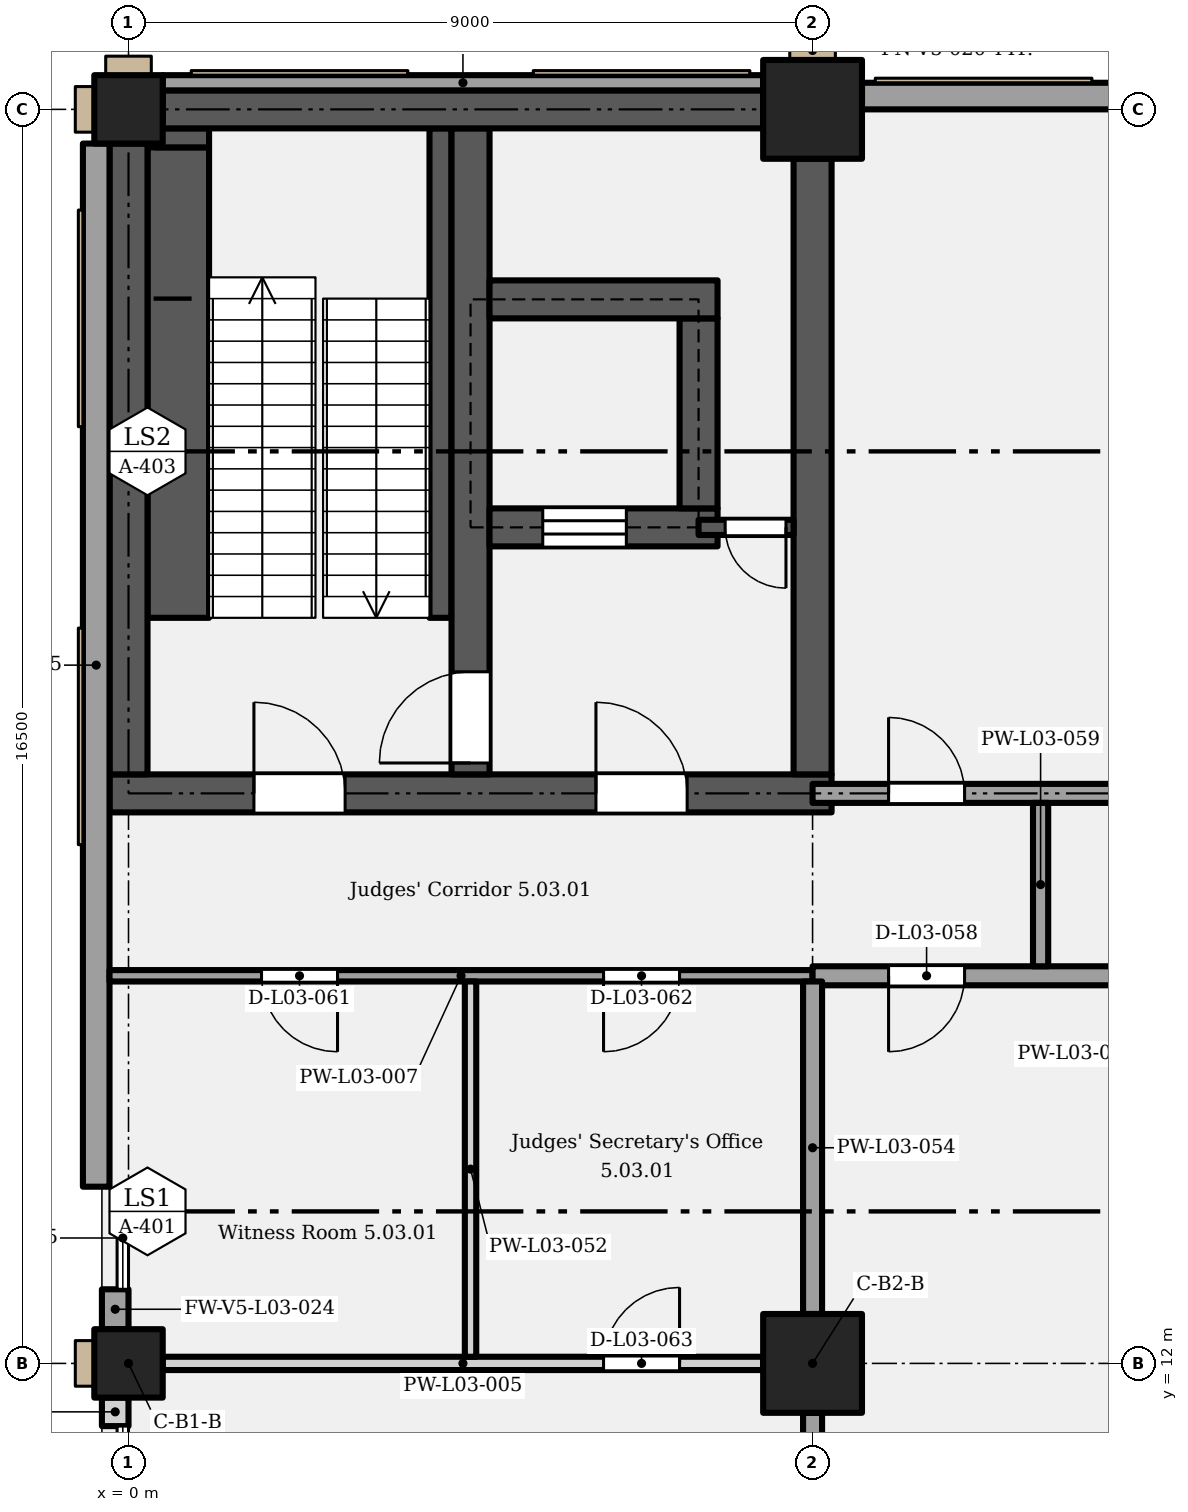
"""IFC4 building model, lengths in metres.
Left out: names, types, materials, properties, quantities, classifications, styles, units other than length and angle.
Written with IfcOpenShell. Run it as: python <this file> out.ifc"""

import sys

from ifc_helpers import new_model, si_unit, direction, frame, frame_2d, origin, origin_2d, place, context, subcontext, project, spatial, rectangle, extrude, element, fill, save


model = new_model("IFC4")
c1 = context("Model", 3, precision=1e-05, world=origin(), true_north=direction((0.0, 1.0)))
c2 = subcontext(c1, "Body", "Model", "MODEL_VIEW")
j1 = project(units=[si_unit("LENGTHUNIT", "METRE"), si_unit("PLANEANGLEUNIT", "RADIAN")], contexts=[c1])
p1 = place(None, origin())
s1 = spatial("IfcSite", under=j1, at=p1, CompositionType="ELEMENT")
p2 = place(p1, origin())
s2 = spatial("IfcBuilding", under=s1, at=p2, CompositionType="ELEMENT")
p3 = place(p2, frame((0.0, 0.0, 17.4)))
s3 = spatial("IfcBuildingStorey", under=s2, at=p3, CompositionType="ELEMENT", Elevation=17.4)
p4 = place(p3, frame((0.0, 12.0, 0.0), z_axis=(0.0, 0.0, 1.0), x_axis=(1.0, 0.0, 0.0)))
e1 = element("IfcColumn", 1, at=p4, inside=s3, PredefinedType="COLUMN", context=c2, shape_type="SweptSolid", body=[
    extrude(rectangle(XDim=0.9, YDim=0.9, at=origin_2d()), origin(), (0.0, 0.0, 1.0), 5.4),
])
p5 = place(p3, frame((9.0, 12.0, 0.0), z_axis=(0.0, 0.0, 1.0), x_axis=(1.0, 0.0, 0.0)))
e2 = element("IfcColumn", 2, at=p5, inside=s3, PredefinedType="COLUMN", context=c2, shape_type="SweptSolid", body=[
    extrude(rectangle(XDim=1.3, YDim=1.3, at=origin_2d()), origin(), (0.0, 0.0, 1.0), 5.4),
])
p6 = place(p3, frame((0.0, 28.5, 0.0), z_axis=(0.0, 0.0, 1.0), x_axis=(1.0, 0.0, 0.0)))
e3 = element("IfcColumn", 3, at=p6, inside=s3, PredefinedType="COLUMN", context=c2, shape_type="SweptSolid", body=[
    extrude(rectangle(XDim=0.9, YDim=0.9, at=origin_2d()), origin(), (0.0, 0.0, 1.0), 5.4),
])
p7 = place(p3, frame((9.0, 28.5, 0.0), z_axis=(0.0, 0.0, 1.0), x_axis=(1.0, 0.0, 0.0)))
e4 = element("IfcColumn", 4, at=p7, inside=s3, PredefinedType="COLUMN", context=c2, shape_type="SweptSolid", body=[
    extrude(rectangle(XDim=1.3, YDim=1.3, at=origin_2d()), origin(), (0.0, 0.0, 1.0), 5.4),
])
p8 = place(p3, frame((-0.25, 19.5, 0.0), z_axis=(0.0, 0.0, 1.0), x_axis=(1.0, 0.0, 0.0)))
e5 = element("IfcWall", 5, at=p8, inside=s3, PredefinedType="SHEAR", context=c2, shape_type="SweptSolid", body=[
    extrude(rectangle(XDim=9.5, YDim=0.5, at=frame_2d((4.75, 0.0))), origin(), (0.0, 0.0, 1.0), 5.15),
])
p9 = place(p8, frame((1.9, 0.0, 0.0)))
e6 = element("IfcOpeningElement", 6, at=p9, cuts=e5, PredefinedType="OPENING", context=c2, shape_type="SweptSolid", body=[
    extrude(rectangle(XDim=1.2, YDim=2.1, at=frame_2d((0.6, 1.05))), frame((0.0, 0.26, 0.0), z_axis=(0.0, -1.0, 0.0), x_axis=(1.0, 0.0, 0.0)), (0.0, 0.0, 1.0), 0.52),
])
p10 = place(p8, frame((6.4, 0.0, 0.0)))
e7 = element("IfcOpeningElement", 7, at=p10, cuts=e5, PredefinedType="OPENING", context=c2, shape_type="SweptSolid", body=[
    extrude(rectangle(XDim=1.2, YDim=2.1, at=frame_2d((0.6, 1.05))), frame((0.0, 0.26, 0.0), z_axis=(0.0, -1.0, 0.0), x_axis=(1.0, 0.0, 0.0)), (0.0, 0.0, 1.0), 0.52),
])
p11 = place(p3, frame((0.0, 19.75, 0.0), z_axis=(0.0, 0.0, 1.0), x_axis=(0.0, 1.0, 0.0)))
e8 = element("IfcWall", 8, at=p11, inside=s3, PredefinedType="SHEAR", context=c2, shape_type="SweptSolid", body=[
    extrude(rectangle(XDim=8.3, YDim=0.5, at=frame_2d((4.15, 0.0))), origin(), (0.0, 0.0, 1.0), 5.15),
])
p12 = place(p3, frame((4.5, 19.75, 0.0), z_axis=(0.0, 0.0, 1.0), x_axis=(0.0, 1.0, 0.0)))
e9 = element("IfcWall", 9, at=p12, inside=s3, PredefinedType="SHEAR", context=c2, shape_type="SweptSolid", body=[
    extrude(rectangle(XDim=8.5, YDim=0.5, at=frame_2d((4.25, 0.0))), origin(), (0.0, 0.0, 1.0), 5.15),
])
p13 = place(p12, frame((0.15, 0.0, 0.0)))
e10 = element("IfcOpeningElement", 10, at=p13, cuts=e9, PredefinedType="OPENING", context=c2, shape_type="SweptSolid", body=[
    extrude(rectangle(XDim=1.2, YDim=2.1, at=frame_2d((0.6, 1.05))), frame((0.0, 0.26, 0.0), z_axis=(0.0, -1.0, 0.0), x_axis=(1.0, 0.0, 0.0)), (0.0, 0.0, 1.0), 0.52),
])
p14 = place(p3, frame((9.0, 19.75, 0.0), z_axis=(0.0, 0.0, 1.0), x_axis=(0.0, 1.0, 0.0)))
e11 = element("IfcWall", 11, at=p14, inside=s3, PredefinedType="SHEAR", context=c2, shape_type="SweptSolid", body=[
    extrude(rectangle(XDim=8.1, YDim=0.5, at=frame_2d((4.05, 0.0))), origin(), (0.0, 0.0, 1.0), 5.15),
])
p15 = place(p3, frame((4.75, 23.0, 0.0), z_axis=(0.0, 0.0, 1.0), x_axis=(1.0, 0.0, 0.0)))
e12 = element("IfcWall", 12, at=p15, inside=s3, PredefinedType="SHEAR", context=c2, shape_type="SweptSolid", body=[
    extrude(rectangle(XDim=3.0, YDim=0.5, at=frame_2d((1.5, 0.0))), origin(), (0.0, 0.0, 1.0), 5.15),
])
p16 = place(p15, frame((0.7, 0.0, 0.0)))
e13 = element("IfcOpeningElement", 13, at=p16, cuts=e12, PredefinedType="OPENING", context=c2, shape_type="SweptSolid", body=[
    extrude(rectangle(XDim=1.1, YDim=2.1, at=frame_2d((0.55, 1.05))), frame((0.0, 0.26, 0.0), z_axis=(0.0, -1.0, 0.0), x_axis=(1.0, 0.0, 0.0)), (0.0, 0.0, 1.0), 0.52),
])
p17 = place(p3, frame((7.5, 23.25, 0.0), z_axis=(0.0, 0.0, 1.0), x_axis=(0.0, 1.0, 0.0)))
e14 = element("IfcWall", 14, at=p17, inside=s3, PredefinedType="SHEAR", context=c2, shape_type="SweptSolid", body=[
    extrude(rectangle(XDim=2.5, YDim=0.5, at=frame_2d((1.25, 0.0))), origin(), (0.0, 0.0, 1.0), 5.15),
])
p18 = place(p3, frame((4.75, 26.0, 0.0), z_axis=(0.0, 0.0, 1.0), x_axis=(1.0, 0.0, 0.0)))
e15 = element("IfcWall", 15, at=p18, inside=s3, PredefinedType="SHEAR", context=c2, shape_type="SweptSolid", body=[
    extrude(rectangle(XDim=3.0, YDim=0.5, at=frame_2d((1.5, 0.0))), origin(), (0.0, 0.0, 1.0), 5.15),
])
p19 = place(p3, frame((0.45, 28.5, 0.0), z_axis=(0.0, 0.0, 1.0), x_axis=(1.0, 0.0, 0.0)))
e16 = element("IfcWall", 16, at=p19, inside=s3, PredefinedType="SHEAR", context=c2, shape_type="SweptSolid", body=[
    extrude(rectangle(XDim=7.9, YDim=0.5, at=frame_2d((3.95, 0.0))), origin(), (0.0, 0.0, 1.0), 5.15),
])
p20 = place(p3, frame((0.45, 28.85, 0.0), z_axis=(0.0, 0.0, 1.0), x_axis=(1.0, 0.0, 0.0)))
e17 = element("IfcWall", 17, at=p20, inside=s3, PredefinedType="SOLIDWALL", context=c2, shape_type="SweptSolid", body=[
    extrude(rectangle(XDim=7.9, YDim=0.2, at=frame_2d((3.95, 0.0))), origin(), (0.0, 0.0, 1.0), 5.15),
])
p21 = place(p3, frame((9.65, 28.675, 0.0), z_axis=(0.0, 0.0, 1.0), x_axis=(1.0, 0.0, 0.0)))
e18 = element("IfcWall", 18, at=p21, inside=s3, PredefinedType="SOLIDWALL", context=c2, shape_type="SweptSolid", body=[
    extrude(rectangle(XDim=7.7, YDim=0.35, at=frame_2d((3.85, 0.0))), origin(), (0.0, 0.0, 1.0), 5.15),
])
p22 = place(p3, frame((-0.175, 11.175, 0.0), z_axis=(0.0, 0.0, 1.0), x_axis=(0.0, 1.0, 0.0)))
e19 = element("IfcWall", 19, at=p22, inside=s3, PredefinedType="SOLIDWALL", context=c2, shape_type="SweptSolid", body=[
    extrude(rectangle(XDim=0.375, YDim=0.35, at=frame_2d((0.188, 0.0))), origin(), (0.0, 0.0, 1.0), 5.15),
])
p23 = place(p3, frame((-0.175, 12.45, 0.0), z_axis=(0.0, 0.0, 1.0), x_axis=(0.0, 1.0, 0.0)))
e20 = element("IfcWall", 20, at=p23, inside=s3, PredefinedType="SOLIDWALL", context=c2, shape_type="SweptSolid", body=[
    extrude(rectangle(XDim=0.525, YDim=0.35, at=frame_2d((0.263, 0.0))), origin(), (0.0, 0.0, 1.0), 5.15),
])
p24 = place(p3, frame((-0.425, 14.325, 0.0), z_axis=(0.0, 0.0, 1.0), x_axis=(0.0, 1.0, 0.0)))
e21 = element("IfcWall", 21, at=p24, inside=s3, PredefinedType="SOLIDWALL", context=c2, shape_type="SweptSolid", body=[
    extrude(rectangle(XDim=13.725, YDim=0.35, at=frame_2d((6.863, 0.0))), origin(), (0.0, 0.0, 1.0), 5.15),
])
p25 = place(p3, frame((0.45, 12.0, 0.0), z_axis=(0.0, 0.0, 1.0), x_axis=(1.0, 0.0, 0.0)))
e22 = element("IfcWall", 22, at=p25, inside=s3, PredefinedType="PARTITIONING", context=c2, shape_type="SweptSolid", body=[
    extrude(rectangle(XDim=7.9, YDim=0.175, at=frame_2d((3.95, 0.0))), origin(), (0.0, 0.0, 1.0), 4.4),
])
p26 = place(p25, frame((5.8, 0.0, 0.0)))
e23 = element("IfcOpeningElement", 23, at=p26, cuts=e22, PredefinedType="OPENING", context=c2, shape_type="SweptSolid", body=[
    extrude(rectangle(XDim=1.0, YDim=2.1, at=frame_2d((0.5, 1.05))), frame((0.0, 0.097, 0.0), z_axis=(0.0, -1.0, 0.0), x_axis=(1.0, 0.0, 0.0)), (0.0, 0.0, 1.0), 0.195),
])
p27 = place(p3, frame((-0.25, 17.1, 0.0), z_axis=(0.0, 0.0, 1.0), x_axis=(1.0, 0.0, 0.0)))
e24 = element("IfcWall", 24, at=p27, inside=s3, PredefinedType="PARTITIONING", context=c2, shape_type="SweptSolid", body=[
    extrude(rectangle(XDim=9.25, YDim=0.15, at=frame_2d((4.625, 0.0))), origin(), (0.0, 0.0, 1.0), 5.15),
])
p28 = place(p27, frame((3.0, 0.0, 0.0), z_axis=(0.0, 0.0, 1.0), x_axis=(-1.0, 0.0, 0.0)))
e25 = element("IfcOpeningElement", 25, at=p28, cuts=e24, PredefinedType="OPENING", context=c2, shape_type="SweptSolid", body=[
    extrude(rectangle(XDim=1.0, YDim=2.1, at=frame_2d((0.5, 1.05))), frame((0.0, 0.085, 0.0), z_axis=(0.0, -1.0, 0.0), x_axis=(1.0, 0.0, 0.0)), (0.0, 0.0, 1.0), 0.17),
])
p29 = place(p27, frame((7.5, 0.0, 0.0), z_axis=(0.0, 0.0, 1.0), x_axis=(-1.0, 0.0, 0.0)))
e26 = element("IfcOpeningElement", 26, at=p29, cuts=e24, PredefinedType="OPENING", context=c2, shape_type="SweptSolid", body=[
    extrude(rectangle(XDim=1.0, YDim=2.1, at=frame_2d((0.5, 1.05))), frame((0.0, 0.085, 0.0), z_axis=(0.0, -1.0, 0.0), x_axis=(1.0, 0.0, 0.0)), (0.0, 0.0, 1.0), 0.17),
])
p30 = place(p3, frame((9.0, 17.1, 0.0), z_axis=(0.0, 0.0, 1.0), x_axis=(1.0, 0.0, 0.0)))
e27 = element("IfcWall", 27, at=p30, inside=s3, PredefinedType="PARTITIONING", context=c2, shape_type="SweptSolid", body=[
    extrude(rectangle(XDim=9.0, YDim=0.25, at=frame_2d((4.5, 0.0))), origin(), (0.0, 0.0, 1.0), 5.15),
])
p31 = place(p30, frame((6.9, 0.0, 0.0), z_axis=(0.0, 0.0, 1.0), x_axis=(-1.0, 0.0, 0.0)))
e28 = element("IfcOpeningElement", 28, at=p31, cuts=e27, PredefinedType="OPENING", context=c2, shape_type="SweptSolid", body=[
    extrude(rectangle(XDim=1.8, YDim=2.4, at=frame_2d((0.9, 1.2))), frame((0.0, 0.135, 0.0), z_axis=(0.0, -1.0, 0.0), x_axis=(1.0, 0.0, 0.0)), (0.0, 0.0, 1.0), 0.27),
])
p32 = place(p30, frame((2.0, 0.0, 0.0), z_axis=(0.0, 0.0, 1.0), x_axis=(-1.0, 0.0, 0.0)))
e29 = element("IfcOpeningElement", 29, at=p32, cuts=e27, PredefinedType="OPENING", context=c2, shape_type="SweptSolid", body=[
    extrude(rectangle(XDim=1.0, YDim=2.1, at=frame_2d((0.5, 1.05))), frame((0.0, 0.135, 0.0), z_axis=(0.0, -1.0, 0.0), x_axis=(1.0, 0.0, 0.0)), (0.0, 0.0, 1.0), 0.27),
])
p33 = place(p3, frame((9.0, 19.5, 0.0), z_axis=(0.0, 0.0, 1.0), x_axis=(1.0, 0.0, 0.0)))
e30 = element("IfcWall", 30, at=p33, inside=s3, PredefinedType="PARTITIONING", context=c2, shape_type="SweptSolid", body=[
    extrude(rectangle(XDim=9.0, YDim=0.25, at=frame_2d((4.5, 0.0))), origin(), (0.0, 0.0, 1.0), 5.15),
])
p34 = place(p33, frame((5.1, 0.0, 0.0)))
e31 = element("IfcOpeningElement", 31, at=p34, cuts=e30, PredefinedType="OPENING", context=c2, shape_type="SweptSolid", body=[
    extrude(rectangle(XDim=1.8, YDim=2.4, at=frame_2d((0.9, 1.2))), frame((0.0, 0.135, 0.0), z_axis=(0.0, -1.0, 0.0), x_axis=(1.0, 0.0, 0.0)), (0.0, 0.0, 1.0), 0.27),
])
p35 = place(p33, frame((1.0, 0.0, 0.0)))
e32 = element("IfcOpeningElement", 32, at=p35, cuts=e30, PredefinedType="OPENING", context=c2, shape_type="SweptSolid", body=[
    extrude(rectangle(XDim=1.0, YDim=2.1, at=frame_2d((0.5, 1.05))), frame((0.0, 0.135, 0.0), z_axis=(0.0, -1.0, 0.0), x_axis=(1.0, 0.0, 0.0)), (0.0, 0.0, 1.0), 0.27),
])
p36 = place(p3, frame((7.5, 23.0, 0.0), z_axis=(0.0, 0.0, 1.0), x_axis=(1.0, 0.0, 0.0)))
e33 = element("IfcWall", 33, at=p36, inside=s3, PredefinedType="SHEAR", context=c2, shape_type="SweptSolid", body=[
    extrude(rectangle(XDim=1.25, YDim=0.2, at=frame_2d((0.625, 0.0))), origin(), (0.0, 0.0, 1.0), 5.15),
])
p37 = place(p36, frame((1.15, 0.0, 0.0), z_axis=(0.0, 0.0, 1.0), x_axis=(-1.0, 0.0, 0.0)))
e34 = element("IfcOpeningElement", 34, at=p37, cuts=e33, PredefinedType="OPENING", context=c2, shape_type="SweptSolid", body=[
    extrude(rectangle(XDim=0.8, YDim=2.0, at=frame_2d((0.4, 1.0))), frame((0.0, 0.11, 0.0), z_axis=(0.0, -1.0, 0.0), x_axis=(1.0, 0.0, 0.0)), (0.0, 0.0, 1.0), 0.22),
])
p38 = place(p3, frame((4.5, 12.087, 0.0), z_axis=(0.0, 0.0, 1.0), x_axis=(0.0, 1.0, 0.0)))
e35 = element("IfcWall", 35, at=p38, inside=s3, PredefinedType="PARTITIONING", context=c2, shape_type="SweptSolid", body=[
    extrude(rectangle(XDim=4.938, YDim=0.15, at=frame_2d((2.469, 0.0))), origin(), (0.0, 0.0, 1.0), 5.15),
])
p39 = place(p3, frame((9.0, 0.65, 0.0), z_axis=(0.0, 0.0, 1.0), x_axis=(0.0, 1.0, 0.0)))
e36 = element("IfcWall", 36, at=p39, inside=s3, PredefinedType="PARTITIONING", context=c2, shape_type="SweptSolid", body=[
    extrude(rectangle(XDim=10.7, YDim=0.25, at=frame_2d((5.35, 0.0))), origin(), (0.0, 0.0, 1.0), 4.4),
])
p40 = place(p39, frame((5.85, 0.0, 0.0), z_axis=(0.0, 0.0, 1.0), x_axis=(-1.0, 0.0, 0.0)))
e37 = element("IfcOpeningElement", 37, at=p40, cuts=e36, PredefinedType="OPENING", context=c2, shape_type="SweptSolid", body=[
    extrude(rectangle(XDim=1.0, YDim=2.1, at=frame_2d((0.5, 1.05))), frame((0.0, 0.135, 0.0), z_axis=(0.0, -1.0, 0.0), x_axis=(1.0, 0.0, 0.0)), (0.0, 0.0, 1.0), 0.27),
])
p41 = place(p3, frame((9.0, 12.65, 0.0), z_axis=(0.0, 0.0, 1.0), x_axis=(0.0, 1.0, 0.0)))
e38 = element("IfcWall", 38, at=p41, inside=s3, PredefinedType="PARTITIONING", context=c2, shape_type="SweptSolid", body=[
    extrude(rectangle(XDim=4.375, YDim=0.25, at=frame_2d((2.188, 0.0))), origin(), (0.0, 0.0, 1.0), 4.2),
])
p42 = place(p3, frame((12.0, 17.225, 0.0), z_axis=(0.0, 0.0, 1.0), x_axis=(0.0, 1.0, 0.0)))
e39 = element("IfcWall", 39, at=p42, inside=s3, PredefinedType="PARTITIONING", context=c2, shape_type="SweptSolid", body=[
    extrude(rectangle(XDim=2.15, YDim=0.2, at=frame_2d((1.075, 0.0))), origin(), (0.0, 0.0, 1.0), 5.15),
])
p43 = place(p3, frame((0.655, 21.81, 0.0), z_axis=(0.0, 0.0, 1.0), x_axis=(0.0, 1.0, 0.0)))
e40 = element("IfcWall", 40, at=p43, inside=s3, PredefinedType="SHEAR", context=c2, shape_type="SweptSolid", body=[
    extrude(rectangle(XDim=6.19, YDim=0.81, at=frame_2d((3.095, 0.0))), origin(), (0.0, 0.0, 1.0), 2.587),
])
p44 = place(p3, frame((0.705, 28.0, 0.0), z_axis=(0.0, 0.0, 1.0), x_axis=(0.0, 1.0, 0.0)))
e41 = element("IfcWall", 41, at=p44, inside=s3, PredefinedType="SHEAR", context=c2, shape_type="SweptSolid", body=[
    extrude(rectangle(XDim=0.25, YDim=0.71, at=frame_2d((0.125, 0.0))), origin(), (0.0, 0.0, 1.0), 2.587),
])
p45 = place(p3, frame((4.105, 21.81, 0.0), z_axis=(0.0, 0.0, 1.0), x_axis=(0.0, 1.0, 0.0)))
e42 = element("IfcWall", 42, at=p45, inside=s3, PredefinedType="SHEAR", context=c2, shape_type="SweptSolid", body=[
    extrude(rectangle(XDim=6.44, YDim=0.29, at=frame_2d((3.22, 0.0))), origin(), (0.0, 0.0, 1.0), 2.587),
])
p46 = place(p9, origin())
e43 = element("IfcDoor", 43, at=p46, inside=s3, OperationType="SINGLE_SWING_LEFT", PredefinedType="DOOR", context=c2, shape_type="SweptSolid", body=[
    extrude(rectangle(XDim=1.2, YDim=2.1, at=frame_2d((0.6, 1.05))), frame((0.0, 0.025, 0.0), z_axis=(0.0, -1.0, 0.0), x_axis=(1.0, 0.0, 0.0)), (0.0, 0.0, 1.0), 0.05),
])
fill(e6, e43)
p47 = place(p13, origin())
e44 = element("IfcDoor", 44, at=p47, inside=s3, OperationType="SINGLE_SWING_LEFT", PredefinedType="DOOR", context=c2, shape_type="SweptSolid", body=[
    extrude(rectangle(XDim=1.2, YDim=2.1, at=frame_2d((0.6, 1.05))), frame((0.0, 0.025, 0.0), z_axis=(0.0, -1.0, 0.0), x_axis=(1.0, 0.0, 0.0)), (0.0, 0.0, 1.0), 0.05),
])
fill(e10, e44)
p48 = place(p10, origin())
e45 = element("IfcDoor", 45, at=p48, inside=s3, OperationType="SINGLE_SWING_LEFT", PredefinedType="DOOR", context=c2, shape_type="SweptSolid", body=[
    extrude(rectangle(XDim=1.2, YDim=2.1, at=frame_2d((0.6, 1.05))), frame((0.0, 0.025, 0.0), z_axis=(0.0, -1.0, 0.0), x_axis=(1.0, 0.0, 0.0)), (0.0, 0.0, 1.0), 0.05),
])
fill(e7, e45)
p49 = place(p16, origin())
e46 = element("IfcDoor", 46, at=p49, inside=s3, OperationType="SLIDING_TO_LEFT", PredefinedType="DOOR", context=c2, shape_type="SweptSolid", body=[
    extrude(rectangle(XDim=1.1, YDim=2.1, at=frame_2d((0.55, 1.05))), frame((0.0, 0.025, 0.0), z_axis=(0.0, -1.0, 0.0), x_axis=(1.0, 0.0, 0.0)), (0.0, 0.0, 1.0), 0.05),
])
fill(e13, e46)
p50 = place(p37, origin())
e47 = element("IfcDoor", 47, at=p50, inside=s3, OperationType="SINGLE_SWING_LEFT", PredefinedType="DOOR", context=c2, shape_type="SweptSolid", body=[
    extrude(rectangle(XDim=0.8, YDim=2.0, at=frame_2d((0.4, 1.0))), frame((0.0, 0.025, 0.0), z_axis=(0.0, -1.0, 0.0), x_axis=(1.0, 0.0, 0.0)), (0.0, 0.0, 1.0), 0.05),
])
fill(e34, e47)
p51 = place(p32, origin())
e48 = element("IfcDoor", 48, at=p51, inside=s3, OperationType="SINGLE_SWING_RIGHT", PredefinedType="DOOR", context=c2, shape_type="SweptSolid", body=[
    extrude(rectangle(XDim=1.0, YDim=2.1, at=frame_2d((0.5, 1.05))), frame((0.0, 0.025, 0.0), z_axis=(0.0, -1.0, 0.0), x_axis=(1.0, 0.0, 0.0)), (0.0, 0.0, 1.0), 0.05),
])
fill(e29, e48)
p52 = place(p35, origin())
e49 = element("IfcDoor", 49, at=p52, inside=s3, OperationType="SINGLE_SWING_LEFT", PredefinedType="DOOR", context=c2, shape_type="SweptSolid", body=[
    extrude(rectangle(XDim=1.0, YDim=2.1, at=frame_2d((0.5, 1.05))), frame((0.0, 0.025, 0.0), z_axis=(0.0, -1.0, 0.0), x_axis=(1.0, 0.0, 0.0)), (0.0, 0.0, 1.0), 0.05),
])
fill(e32, e49)
p53 = place(p28, origin())
e50 = element("IfcDoor", 50, at=p53, inside=s3, OperationType="SINGLE_SWING_LEFT", PredefinedType="DOOR", context=c2, shape_type="SweptSolid", body=[
    extrude(rectangle(XDim=1.0, YDim=2.1, at=frame_2d((0.5, 1.05))), frame((0.0, 0.025, 0.0), z_axis=(0.0, -1.0, 0.0), x_axis=(1.0, 0.0, 0.0)), (0.0, 0.0, 1.0), 0.05),
])
fill(e25, e50)
p54 = place(p29, origin())
e51 = element("IfcDoor", 51, at=p54, inside=s3, OperationType="SINGLE_SWING_RIGHT", PredefinedType="DOOR", context=c2, shape_type="SweptSolid", body=[
    extrude(rectangle(XDim=1.0, YDim=2.1, at=frame_2d((0.5, 1.05))), frame((0.0, 0.025, 0.0), z_axis=(0.0, -1.0, 0.0), x_axis=(1.0, 0.0, 0.0)), (0.0, 0.0, 1.0), 0.05),
])
fill(e26, e51)
p55 = place(p26, origin())
e52 = element("IfcDoor", 52, at=p55, inside=s3, OperationType="SINGLE_SWING_RIGHT", PredefinedType="DOOR", context=c2, shape_type="SweptSolid", body=[
    extrude(rectangle(XDim=1.0, YDim=2.1, at=frame_2d((0.5, 1.05))), frame((0.0, 0.025, 0.0), z_axis=(0.0, -1.0, 0.0), x_axis=(1.0, 0.0, 0.0)), (0.0, 0.0, 1.0), 0.05),
])
fill(e23, e52)
save(model, sys.argv[1])
